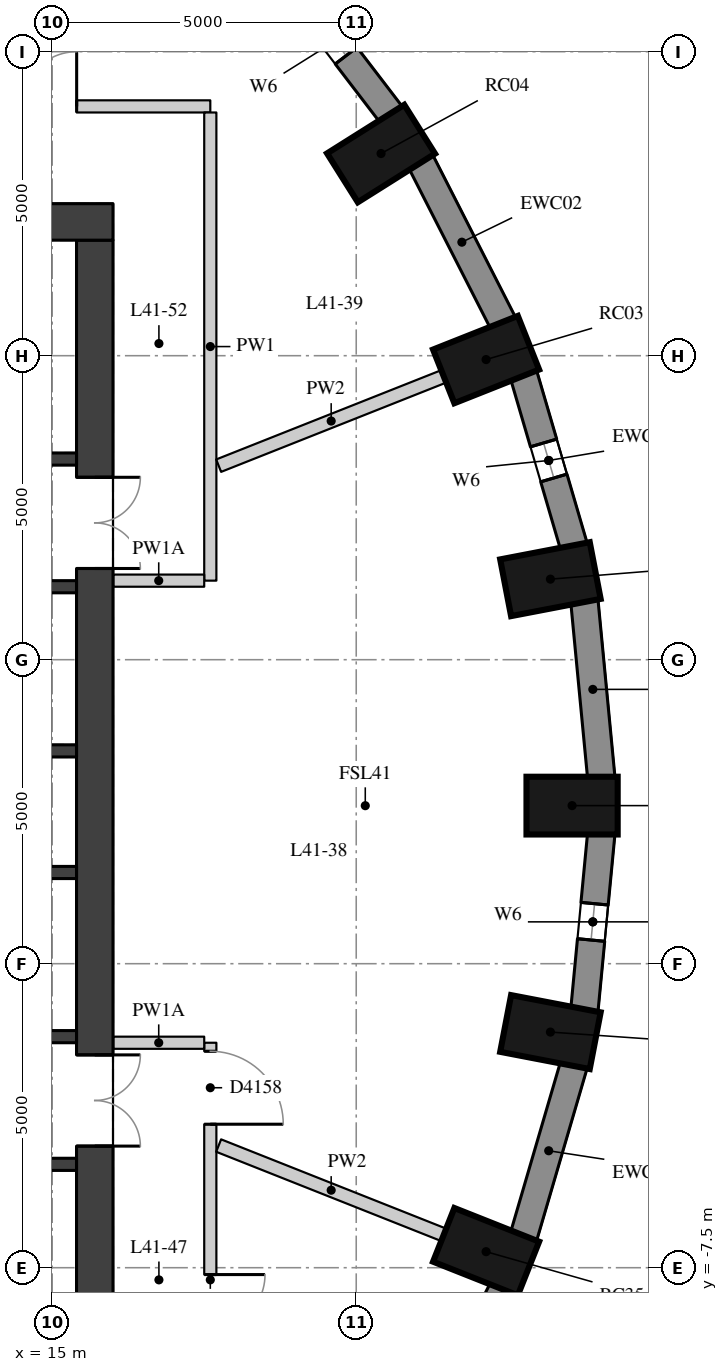
"""IFC4 building model, lengths in metres.
Left out: names, types, materials, properties, quantities, classifications, styles, units other than length and angle.
Written with IfcOpenShell. Run it as: python <this file> out.ifc"""

import sys

from ifc_helpers import new_model, si_unit, direction, frame, frame_2d, origin, origin_2d, place, context, subcontext, project, spatial, rectangle, extrude, element, fill, save


model = new_model("IFC4")
c1 = context("Model", 3, precision=1e-05, world=origin(), true_north=direction((0.0, 1.0)))
c2 = subcontext(c1, "Body", "Model", "MODEL_VIEW")
j1 = project(units=[si_unit("LENGTHUNIT", "METRE"), si_unit("PLANEANGLEUNIT", "RADIAN")], contexts=[c1])
p1 = place(None, origin())
s1 = spatial("IfcSite", under=j1, at=p1, CompositionType="ELEMENT")
p2 = place(p1, origin())
s2 = spatial("IfcBuilding", under=s1, at=p2, CompositionType="ELEMENT")
p3 = place(p2, frame((0.0, 0.0, 148.4)))
s3 = spatial("IfcBuildingStorey", under=s2, at=p3, CompositionType="ELEMENT", Elevation=148.4)
for number, where, z_axis, x_axis in (
    (1, (23.55, 0.1, 0.0), (0.0, 0.0, 1.0), (1.0, 0.0, 0.0)),
    (2, (23.194, 3.825, 0.0), (0.0, 0.0, 1.0), (0.982, 0.189, 0.0)),
    (3, (22.136, 7.436, 0.0), (0.0, 0.0, 1.0), (0.93, 0.369, 0.0)),
    (4, (20.408, 10.825, 0.0), (0.0, 0.0, 1.0), (0.846, 0.533, 0.0)),
    (5, (22.136, -7.236, 0.0), (0.0, 0.0, 1.0), (0.93, -0.369, 0.0)),
    (6, (23.194, -3.625, 0.0), (0.0, 0.0, 1.0), (0.982, -0.189, 0.0)),
):
    element("IfcColumn", number, at=place(p3, frame(where, z_axis=z_axis, x_axis=x_axis)), inside=s3, PredefinedType="COLUMN", context=c2, shape_type="SweptSolid", body=[
        extrude(rectangle(XDim=1.5, YDim=0.95, at=origin_2d()), origin(), (0.0, 0.0, 1.0), 3.3),
    ])
p4 = place(p3, frame((24.031, 0.555, 0.0), z_axis=(0.0, 0.0, 1.0), x_axis=(-0.095265737322, 0.995451876935, 0.0)))
e7 = element("IfcWall", 7, at=p4, inside=s3, PredefinedType="SOLIDWALL", context=c2, shape_type="SweptSolid", body=[
    extrude(rectangle(XDim=2.927, YDim=0.45, at=frame_2d((1.463, 0.0))), origin(), (0.0, 0.0, 1.0), 3.02),
])
p5 = place(p3, frame((23.58, 4.362, 0.0), z_axis=(0.0, 0.0, 1.0), x_axis=(-0.281049481624, 0.959693278542, 0.0)))
e8 = element("IfcWall", 8, at=p5, inside=s3, PredefinedType="SOLIDWALL", context=c2, shape_type="SweptSolid", body=[
    extrude(rectangle(XDim=2.948, YDim=0.45, at=frame_2d((1.474, 0.0))), origin(), (0.0, 0.0, 1.0), 3.02),
])
p6 = place(p5, frame((1.174, 0.0, 0.4)))
e9 = element("IfcOpeningElement", 9, at=p6, cuts=e8, PredefinedType="OPENING", context=c2, shape_type="SweptSolid", body=[
    extrude(rectangle(XDim=0.6, YDim=1.75, at=frame_2d((0.3, 0.875))), frame((0.0, 0.235, 0.0), z_axis=(0.0, -1.0, 0.0), x_axis=(1.0, 0.0, 0.0)), (0.0, 0.0, 1.0), 0.47),
])
p7 = place(p3, frame((22.415, 8.037, 0.0), z_axis=(0.0, 0.0, 1.0), x_axis=(-0.454133999889, 0.890933392653, 0.0)))
e10 = element("IfcWall", 10, at=p7, inside=s3, PredefinedType="SOLIDWALL", context=c2, shape_type="SweptSolid", body=[
    extrude(rectangle(XDim=2.986, YDim=0.45, at=frame_2d((1.493, 0.0))), origin(), (0.0, 0.0, 1.0), 3.02),
])
p8 = place(p3, frame((20.574, 11.467, 0.0), z_axis=(0.0, 0.0, 1.0), x_axis=(-0.607817056371, 0.794077090706, 0.0)))
e11 = element("IfcWall", 11, at=p8, inside=s3, PredefinedType="SOLIDWALL", context=c2, shape_type="SweptSolid", body=[
    extrude(rectangle(XDim=3.037, YDim=0.45, at=frame_2d((1.519, 0.0))), origin(), (0.0, 0.0, 1.0), 3.02),
])
p9 = place(p8, frame((1.219, 0.0, 0.4)))
e12 = element("IfcOpeningElement", 12, at=p9, cuts=e11, PredefinedType="OPENING", context=c2, shape_type="SweptSolid", body=[
    extrude(rectangle(XDim=0.6, YDim=1.75, at=frame_2d((0.3, 0.875))), frame((0.0, 0.235, 0.0), z_axis=(0.0, -1.0, 0.0), x_axis=(1.0, 0.0, 0.0)), (0.0, 0.0, 1.0), 0.47),
])
p10 = place(p3, frame((21.059, -10.497, 0.0), z_axis=(0.0, 0.0, 1.0), x_axis=(0.454133999889, 0.890933392653, 0.0)))
e13 = element("IfcWall", 13, at=p10, inside=s3, PredefinedType="SOLIDWALL", context=c2, shape_type="SweptSolid", body=[
    extrude(rectangle(XDim=2.986, YDim=0.45, at=frame_2d((1.493, 0.0))), origin(), (0.0, 0.0, 1.0), 3.02),
])
p11 = place(p10, frame((1.193, 0.0, 0.4)))
e14 = element("IfcOpeningElement", 14, at=p11, cuts=e13, PredefinedType="OPENING", context=c2, shape_type="SweptSolid", body=[
    extrude(rectangle(XDim=0.6, YDim=1.75, at=frame_2d((0.3, 0.875))), frame((0.0, 0.235, 0.0), z_axis=(0.0, -1.0, 0.0), x_axis=(1.0, 0.0, 0.0)), (0.0, 0.0, 1.0), 0.47),
])
p12 = place(p3, frame((22.751, -6.991, 0.0), z_axis=(0.0, 0.0, 1.0), x_axis=(0.281049481624, 0.959693278542, 0.0)))
e15 = element("IfcWall", 15, at=p12, inside=s3, PredefinedType="SOLIDWALL", context=c2, shape_type="SweptSolid", body=[
    extrude(rectangle(XDim=2.948, YDim=0.45, at=frame_2d((1.474, 0.0))), origin(), (0.0, 0.0, 1.0), 3.02),
])
p13 = place(p3, frame((23.752, -3.269, 0.0), z_axis=(0.0, 0.0, 1.0), x_axis=(0.095257827044, 0.995452633924, 0.0)))
e16 = element("IfcWall", 16, at=p13, inside=s3, PredefinedType="SOLIDWALL", context=c2, shape_type="SweptSolid", body=[
    extrude(rectangle(XDim=2.927, YDim=0.45, at=frame_2d((1.463, 0.0))), origin(), (0.0, 0.0, 1.0), 3.02),
])
p14 = place(p13, frame((1.163, 0.0, 0.4)))
e17 = element("IfcOpeningElement", 17, at=p14, cuts=e16, PredefinedType="OPENING", context=c2, shape_type="SweptSolid", body=[
    extrude(rectangle(XDim=0.6, YDim=1.75, at=frame_2d((0.3, 0.875))), frame((0.0, 0.235, 0.0), z_axis=(0.0, -1.0, 0.0), x_axis=(1.0, 0.0, 0.0)), (0.0, 0.0, 1.0), 0.47),
])
p15 = place(p3, frame((15.7, -9.4, 0.0), z_axis=(0.0, 0.0, 1.0), x_axis=(0.0, 1.0, 0.0)))
e18 = element("IfcWall", 18, at=p15, inside=s3, PredefinedType="SHEAR", context=c2, shape_type="SweptSolid", body=[
    extrude(rectangle(XDim=18.8, YDim=0.6, at=frame_2d((9.4, 0.0))), origin(), (0.0, 0.0, 1.0), 3.02),
])
p16 = place(p15, frame((13.4, 0.0, 0.0)))
e19 = element("IfcOpeningElement", 19, at=p16, cuts=e18, PredefinedType="OPENING", context=c2, shape_type="SweptSolid", body=[
    extrude(rectangle(XDim=1.5, YDim=2.1, at=frame_2d((0.75, 1.05))), frame((0.0, 0.31, 0.0), z_axis=(0.0, -1.0, 0.0), x_axis=(1.0, 0.0, 0.0)), (0.0, 0.0, 1.0), 0.62),
])
p17 = place(p15, frame((3.9, 0.0, 0.0)))
e20 = element("IfcOpeningElement", 20, at=p17, cuts=e18, PredefinedType="OPENING", context=c2, shape_type="SweptSolid", body=[
    extrude(rectangle(XDim=1.5, YDim=2.1, at=frame_2d((0.75, 1.05))), frame((0.0, 0.31, 0.0), z_axis=(0.0, -1.0, 0.0), x_axis=(1.0, 0.0, 0.0)), (0.0, 0.0, 1.0), 0.62),
])
p18 = place(p3, frame((4.0, 9.7, 0.0), z_axis=(0.0, 0.0, 1.0), x_axis=(1.0, 0.0, 0.0)))
e21 = element("IfcWall", 21, at=p18, inside=s3, PredefinedType="SHEAR", context=c2, shape_type="SweptSolid", body=[
    extrude(rectangle(XDim=12.0, YDim=0.6, at=frame_2d((6.0, 0.0))), origin(), (0.0, 0.0, 1.0), 3.02),
])
p19 = place(p3, frame((4.6, 5.8, 0.0), z_axis=(0.0, 0.0, 1.0), x_axis=(1.0, 0.0, 0.0)))
e22 = element("IfcWall", 22, at=p19, inside=s3, PredefinedType="SHEAR", context=c2, shape_type="SweptSolid", body=[
    extrude(rectangle(XDim=10.8, YDim=0.2, at=frame_2d((5.4, 0.0))), origin(), (0.0, 0.0, 1.0), 3.02),
])
p20 = place(p19, frame((7.05, 0.0, 0.0)))
e23 = element("IfcOpeningElement", 23, at=p20, cuts=e22, PredefinedType="OPENING", context=c2, shape_type="SweptSolid", body=[
    extrude(rectangle(XDim=1.1, YDim=2.1, at=frame_2d((0.55, 1.05))), frame((0.0, 0.11, 0.0), z_axis=(0.0, -1.0, 0.0), x_axis=(1.0, 0.0, 0.0)), (0.0, 0.0, 1.0), 0.22),
])
p21 = place(p19, frame((9.05, 0.0, 0.0)))
e24 = element("IfcOpeningElement", 24, at=p21, cuts=e22, PredefinedType="OPENING", context=c2, shape_type="SweptSolid", body=[
    extrude(rectangle(XDim=1.1, YDim=2.1, at=frame_2d((0.55, 1.05))), frame((0.0, 0.11, 0.0), z_axis=(0.0, -1.0, 0.0), x_axis=(1.0, 0.0, 0.0)), (0.0, 0.0, 1.0), 0.22),
])
p22 = place(p3, frame((4.6, 3.7, 0.0), z_axis=(0.0, 0.0, 1.0), x_axis=(1.0, 0.0, 0.0)))
e25 = element("IfcWall", 25, at=p22, inside=s3, PredefinedType="SHEAR", context=c2, shape_type="SweptSolid", body=[
    extrude(rectangle(XDim=10.8, YDim=0.2, at=frame_2d((5.4, 0.0))), origin(), (0.0, 0.0, 1.0), 3.02),
])
p23 = place(p22, frame((6.6, 0.0, 0.0)))
e26 = element("IfcOpeningElement", 26, at=p23, cuts=e25, PredefinedType="OPENING", context=c2, shape_type="SweptSolid", body=[
    extrude(rectangle(XDim=1.1, YDim=2.1, at=frame_2d((0.55, 1.05))), frame((0.0, 0.11, 0.0), z_axis=(0.0, -1.0, 0.0), x_axis=(1.0, 0.0, 0.0)), (0.0, 0.0, 1.0), 0.22),
])
p24 = place(p22, frame((8.9, 0.0, 0.0)))
e27 = element("IfcOpeningElement", 27, at=p24, cuts=e25, PredefinedType="OPENING", context=c2, shape_type="SweptSolid", body=[
    extrude(rectangle(XDim=1.1, YDim=2.1, at=frame_2d((0.55, 1.05))), frame((0.0, 0.11, 0.0), z_axis=(0.0, -1.0, 0.0), x_axis=(1.0, 0.0, 0.0)), (0.0, 0.0, 1.0), 0.22),
])
for number, where, z_axis, x_axis in (
    (28, (4.6, 1.0, 0.0), (0.0, 0.0, 1.0), (1.0, 0.0, 0.0)),
    (29, (4.6, -1.0, 0.0), (0.0, 0.0, 1.0), (1.0, 0.0, 0.0)),
):
    element("IfcWall", number, at=place(p3, frame(where, z_axis=z_axis, x_axis=x_axis)), inside=s3, PredefinedType="SHEAR", context=c2, shape_type="SweptSolid", body=[
        extrude(rectangle(XDim=10.8, YDim=0.2, at=frame_2d((5.4, 0.0))), origin(), (0.0, 0.0, 1.0), 3.02),
    ])
p25 = place(p3, frame((4.6, -3.7, 0.0), z_axis=(0.0, 0.0, 1.0), x_axis=(1.0, 0.0, 0.0)))
e30 = element("IfcWall", 30, at=p25, inside=s3, PredefinedType="SHEAR", context=c2, shape_type="SweptSolid", body=[
    extrude(rectangle(XDim=10.8, YDim=0.2, at=frame_2d((5.4, 0.0))), origin(), (0.0, 0.0, 1.0), 3.02),
])
p26 = place(p25, frame((6.6, 0.0, 0.0)))
e31 = element("IfcOpeningElement", 31, at=p26, cuts=e30, PredefinedType="OPENING", context=c2, shape_type="SweptSolid", body=[
    extrude(rectangle(XDim=1.1, YDim=2.1, at=frame_2d((0.55, 1.05))), frame((0.0, 0.11, 0.0), z_axis=(0.0, -1.0, 0.0), x_axis=(1.0, 0.0, 0.0)), (0.0, 0.0, 1.0), 0.22),
])
p27 = place(p25, frame((8.9, 0.0, 0.0)))
e32 = element("IfcOpeningElement", 32, at=p27, cuts=e30, PredefinedType="OPENING", context=c2, shape_type="SweptSolid", body=[
    extrude(rectangle(XDim=1.1, YDim=2.1, at=frame_2d((0.55, 1.05))), frame((0.0, 0.11, 0.0), z_axis=(0.0, -1.0, 0.0), x_axis=(1.0, 0.0, 0.0)), (0.0, 0.0, 1.0), 0.22),
])
p28 = place(p3, frame((4.6, -5.8, 0.0), z_axis=(0.0, 0.0, 1.0), x_axis=(1.0, 0.0, 0.0)))
e33 = element("IfcWall", 33, at=p28, inside=s3, PredefinedType="SHEAR", context=c2, shape_type="SweptSolid", body=[
    extrude(rectangle(XDim=10.8, YDim=0.2, at=frame_2d((5.4, 0.0))), origin(), (0.0, 0.0, 1.0), 3.02),
])
p29 = place(p3, frame((17.6, -3.8, 0.0), z_axis=(0.0, 0.0, 1.0), x_axis=(0.0, -1.0, 0.0)))
e34 = element("IfcWall", 34, at=p29, inside=s3, PredefinedType="PARTITIONING", context=c2, shape_type="SweptSolid", body=[
    extrude(rectangle(XDim=7.8, YDim=0.2, at=frame_2d((3.9, 0.0))), origin(), (0.0, 0.0, 1.0), 3.02),
])
p30 = place(p29, frame((3.813, 0.0, 0.0)))
e35 = element("IfcOpeningElement", 35, at=p30, cuts=e34, PredefinedType="OPENING", context=c2, shape_type="SweptSolid", body=[
    extrude(rectangle(XDim=1.8, YDim=2.1, at=frame_2d((0.9, 1.05))), frame((0.0, 0.11, 0.0), z_axis=(0.0, -1.0, 0.0), x_axis=(1.0, 0.0, 0.0)), (0.0, 0.0, 1.0), 0.22),
])
p31 = place(p29, frame((0.14, 0.0, 0.0)))
e36 = element("IfcOpeningElement", 36, at=p31, cuts=e34, PredefinedType="OPENING", context=c2, shape_type="SweptSolid", body=[
    extrude(rectangle(XDim=1.2, YDim=2.1, at=frame_2d((0.6, 1.05))), frame((0.0, 0.11, 0.0), z_axis=(0.0, -1.0, 0.0), x_axis=(1.0, 0.0, 0.0)), (0.0, 0.0, 1.0), 0.22),
])
p32 = place(p3, frame((7.05, 11.6, 0.0), z_axis=(0.0, 0.0, 1.0), x_axis=(1.0, 0.0, 0.0)))
e37 = element("IfcWall", 37, at=p32, inside=s3, PredefinedType="PARTITIONING", context=c2, shape_type="SweptSolid", body=[
    extrude(rectangle(XDim=10.551, YDim=0.2, at=frame_2d((5.275, 0.0))), origin(), (0.0, 0.0, 1.0), 3.02),
])
p33 = place(p32, frame((2.264, 0.0, 0.0)))
e38 = element("IfcOpeningElement", 38, at=p33, cuts=e37, PredefinedType="OPENING", context=c2, shape_type="SweptSolid", body=[
    extrude(rectangle(XDim=0.9, YDim=2.1, at=frame_2d((0.45, 1.05))), frame((0.0, 0.11, 0.0), z_axis=(0.0, -1.0, 0.0), x_axis=(1.0, 0.0, 0.0)), (0.0, 0.0, 1.0), 0.22),
])
p34 = place(p32, frame((6.553, 0.0, 0.0)))
e39 = element("IfcOpeningElement", 39, at=p34, cuts=e37, PredefinedType="OPENING", context=c2, shape_type="SweptSolid", body=[
    extrude(rectangle(XDim=1.8, YDim=2.1, at=frame_2d((0.9, 1.05))), frame((0.0, 0.11, 0.0), z_axis=(0.0, -1.0, 0.0), x_axis=(1.0, 0.0, 0.0)), (0.0, 0.0, 1.0), 0.22),
])
p35 = place(p3, frame((17.6, 11.5, 0.0), z_axis=(0.0, 0.0, 1.0), x_axis=(0.0, -1.0, 0.0)))
e40 = element("IfcWall", 40, at=p35, inside=s3, PredefinedType="PARTITIONING", context=c2, shape_type="SweptSolid", body=[
    extrude(rectangle(XDim=7.7, YDim=0.2, at=frame_2d((3.85, 0.0))), origin(), (0.0, 0.0, 1.0), 3.02),
])
for number, where, z_axis, x_axis in (
    (41, (17.5, 3.8, 0.0), (0.0, 0.0, 1.0), (-1.0, 0.0, 0.0)),
    (42, (16.004, -3.8, 0.0), (0.0, 0.0, 1.0), (1.0, 0.0, 0.0)),
):
    element("IfcWall", number, at=place(p3, frame(where, z_axis=z_axis, x_axis=x_axis)), inside=s3, PredefinedType="PARTITIONING", context=c2, shape_type="SweptSolid", body=[
        extrude(rectangle(XDim=1.496, YDim=0.2, at=frame_2d((0.748, 0.0))), origin(), (0.0, 0.0, 1.0), 2.57),
    ])
for number, where, z_axis, x_axis in (
    (43, (21.439, 7.16, 0.0), (0.0, 0.0, 1.0), (-0.93, -0.369, 0.0)),
    (44, (21.439, -6.96, 0.0), (0.0, 0.0, 1.0), (-0.93, 0.369, 0.0)),
):
    element("IfcWall", number, at=place(p3, frame(where, z_axis=z_axis, x_axis=x_axis)), inside=s3, PredefinedType="PARTITIONING", context=c2, shape_type="SweptSolid", body=[
        extrude(rectangle(XDim=3.982, YDim=0.22, at=frame_2d((1.991, 0.0))), origin(), (0.0, 0.0, 1.0), 3.02),
    ])
p36 = place(p6, origin())
e45 = element("IfcWindow", 45, at=p36, inside=s3, PartitioningType="SINGLE_PANEL", PredefinedType="WINDOW", context=c2, shape_type="SweptSolid", body=[
    extrude(rectangle(XDim=0.6, YDim=1.75, at=frame_2d((0.3, 0.875))), frame((0.0, 0.035, 0.0), z_axis=(0.0, -1.0, 0.0), x_axis=(1.0, 0.0, 0.0)), (0.0, 0.0, 1.0), 0.06),
])
fill(e9, e45)
p37 = place(p9, origin())
e46 = element("IfcWindow", 46, at=p37, inside=s3, PartitioningType="SINGLE_PANEL", PredefinedType="WINDOW", context=c2, shape_type="SweptSolid", body=[
    extrude(rectangle(XDim=0.6, YDim=1.75, at=frame_2d((0.3, 0.875))), frame((0.0, 0.035, 0.0), z_axis=(0.0, -1.0, 0.0), x_axis=(1.0, 0.0, 0.0)), (0.0, 0.0, 1.0), 0.06),
])
fill(e12, e46)
p38 = place(p14, origin())
e47 = element("IfcWindow", 47, at=p38, inside=s3, PartitioningType="SINGLE_PANEL", PredefinedType="WINDOW", context=c2, shape_type="SweptSolid", body=[
    extrude(rectangle(XDim=0.6, YDim=1.75, at=frame_2d((0.3, 0.875))), frame((0.0, 0.035, 0.0), z_axis=(0.0, -1.0, 0.0), x_axis=(1.0, 0.0, 0.0)), (0.0, 0.0, 1.0), 0.06),
])
fill(e17, e47)
p39 = place(p16, origin())
e48 = element("IfcDoor", 48, at=p39, inside=s3, OperationType="DOUBLE_DOOR_SINGLE_SWING", PredefinedType="DOOR", context=c2, shape_type="SweptSolid", body=[
    extrude(rectangle(XDim=1.5, YDim=2.1, at=frame_2d((0.75, 1.05))), frame((0.0, 0.025, 0.0), z_axis=(0.0, -1.0, 0.0), x_axis=(1.0, 0.0, 0.0)), (0.0, 0.0, 1.0), 0.05),
])
fill(e19, e48)
p40 = place(p17, origin())
e49 = element("IfcDoor", 49, at=p40, inside=s3, OperationType="DOUBLE_DOOR_SINGLE_SWING", PredefinedType="DOOR", context=c2, shape_type="SweptSolid", body=[
    extrude(rectangle(XDim=1.5, YDim=2.1, at=frame_2d((0.75, 1.05))), frame((0.0, 0.025, 0.0), z_axis=(0.0, -1.0, 0.0), x_axis=(1.0, 0.0, 0.0)), (0.0, 0.0, 1.0), 0.05),
])
fill(e20, e49)
p41 = place(p30, origin())
e50 = element("IfcDoor", 50, at=p41, inside=s3, OperationType="DOUBLE_DOOR_SINGLE_SWING", PredefinedType="DOOR", context=c2, shape_type="SweptSolid", body=[
    extrude(rectangle(XDim=1.8, YDim=2.1, at=frame_2d((0.9, 1.05))), frame((0.0, 0.025, 0.0), z_axis=(0.0, -1.0, 0.0), x_axis=(1.0, 0.0, 0.0)), (0.0, 0.0, 1.0), 0.05),
])
fill(e35, e50)
p42 = place(p31, origin())
e51 = element("IfcDoor", 51, at=p42, inside=s3, OperationType="SINGLE_SWING_RIGHT", PredefinedType="DOOR", context=c2, shape_type="SweptSolid", body=[
    extrude(rectangle(XDim=1.2, YDim=2.1, at=frame_2d((0.6, 1.05))), frame((0.0, 0.025, 0.0), z_axis=(0.0, -1.0, 0.0), x_axis=(1.0, 0.0, 0.0)), (0.0, 0.0, 1.0), 0.05),
])
fill(e36, e51)
p43 = place(p34, origin())
e52 = element("IfcDoor", 52, at=p43, inside=s3, OperationType="DOUBLE_DOOR_SINGLE_SWING", PredefinedType="DOOR", context=c2, shape_type="SweptSolid", body=[
    extrude(rectangle(XDim=1.8, YDim=2.1, at=frame_2d((0.9, 1.05))), frame((0.0, 0.025, 0.0), z_axis=(0.0, -1.0, 0.0), x_axis=(1.0, 0.0, 0.0)), (0.0, 0.0, 1.0), 0.05),
])
fill(e39, e52)
save(model, sys.argv[1])
